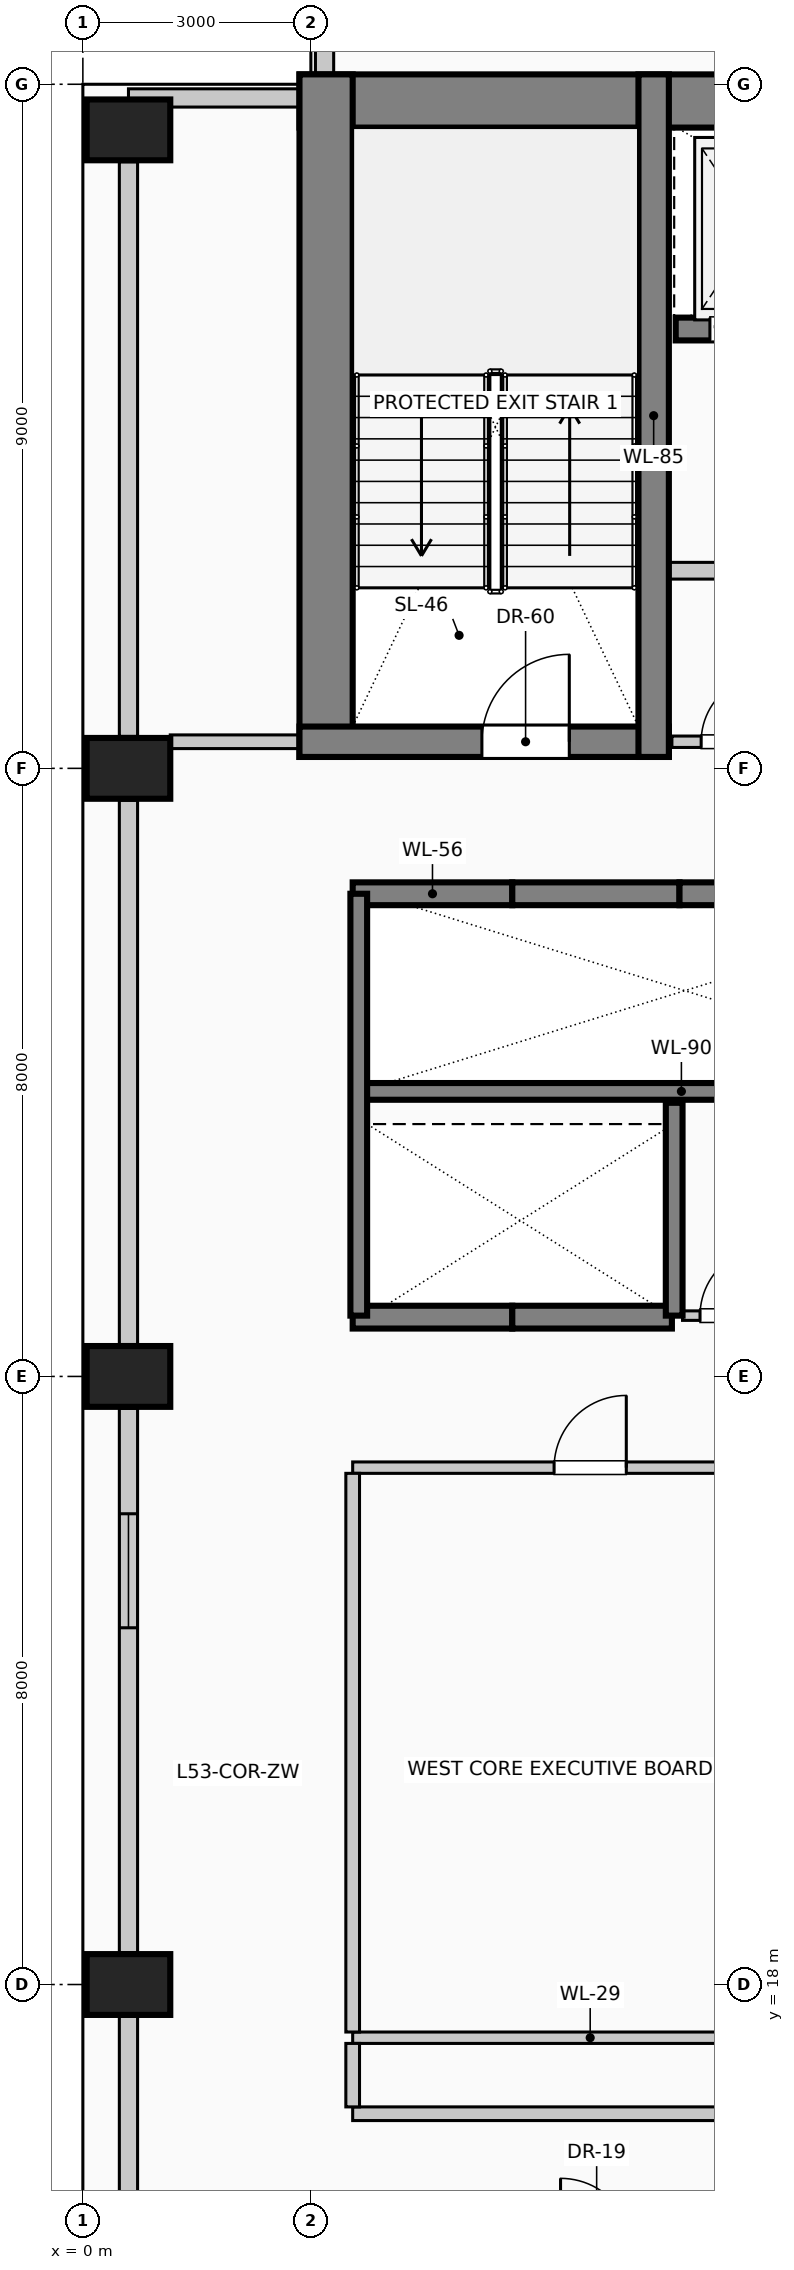
"""IFC4 building model, lengths in metres.
Left out: names, types, materials, properties, quantities, classifications, styles, units other than length and angle.
Written with IfcOpenShell. Run it as: python <this file> out.ifc"""

import sys

from ifc_helpers import new_model, si_unit, direction, frame, frame_2d, origin, origin_2d, place, context, subcontext, project, spatial, rectangle, extrude, element, fill, save


model = new_model("IFC4")
c1 = context("Model", 3, precision=1e-05, world=origin(), true_north=direction((0.0, 1.0)))
c2 = subcontext(c1, "Body", "Model", "MODEL_VIEW")
j1 = project(units=[si_unit("LENGTHUNIT", "METRE"), si_unit("PLANEANGLEUNIT", "RADIAN")], contexts=[c1])
p1 = place(None, origin())
s1 = spatial("IfcSite", under=j1, at=p1, CompositionType="ELEMENT")
p2 = place(p1, origin())
s2 = spatial("IfcBuilding", under=s1, at=p2, CompositionType="ELEMENT")
p3 = place(p2, frame((0.0, 0.0, 218.6)))
s3 = spatial("IfcBuildingStorey", under=s2, at=p3, CompositionType="ELEMENT", Elevation=218.6)
p4 = place(p3, frame((2.85, 42.78, 0.0), z_axis=(0.0, 0.0, 1.0), x_axis=(1.0, 0.0, 0.0)))
e1 = element("IfcWall", 1, at=p4, inside=s3, PredefinedType="SHEAR", context=c2, shape_type="SweptSolid", body=[
    extrude(rectangle(XDim=14.3, YDim=0.7, at=frame_2d((7.15, 0.0))), origin(), (0.0, 0.0, 1.0), 4.0),
])
p5 = place(p3, frame((3.2, 34.15, 0.0), z_axis=(0.0, 0.0, 1.0), x_axis=(0.0, 1.0, 0.0)))
e2 = element("IfcWall", 2, at=p5, inside=s3, PredefinedType="SHEAR", context=c2, shape_type="SweptSolid", body=[
    extrude(rectangle(XDim=8.98, YDim=0.7, at=frame_2d((4.49, 0.0))), origin(), (0.0, 0.0, 1.0), 4.0),
])
p6 = place(p3, frame((2.85, 34.35, 0.0), z_axis=(0.0, 0.0, 1.0), x_axis=(1.0, 0.0, 0.0)))
e3 = element("IfcWall", 3, at=p6, inside=s3, PredefinedType="SHEAR", context=c2, shape_type="SweptSolid", body=[
    extrude(rectangle(XDim=4.86, YDim=0.4, at=frame_2d((2.43, 0.0))), origin(), (0.0, 0.0, 1.0), 4.0),
])
p7 = place(p6, frame((2.4, 0.0, 0.0)))
e4 = element("IfcOpeningElement", 4, at=p7, cuts=e3, PredefinedType="OPENING", context=c2, shape_type="SweptSolid", body=[
    extrude(rectangle(XDim=1.15, YDim=2.2, at=frame_2d((0.575, 1.1))), frame((0.0, 0.21, 0.0), z_axis=(0.0, -1.0, 0.0), x_axis=(1.0, 0.0, 0.0)), (0.0, 0.0, 1.0), 0.42),
])
p8 = place(p3, frame((7.51, 34.15, 0.0), z_axis=(0.0, 0.0, 1.0), x_axis=(0.0, 1.0, 0.0)))
e5 = element("IfcWall", 5, at=p8, inside=s3, PredefinedType="SHEAR", context=c2, shape_type="SweptSolid", body=[
    extrude(rectangle(XDim=8.98, YDim=0.4, at=frame_2d((4.49, 0.0))), origin(), (0.0, 0.0, 1.0), 4.0),
])
for number, where, z_axis, x_axis in (
    (6, (0.6, 18.0, 0.0), (0.0, 0.0, 1.0), (0.0, 1.0, 0.0)),
    (7, (0.6, 26.0, 0.0), (0.0, 0.0, 1.0), (0.0, 1.0, 0.0)),
    (8, (0.6, 34.0, 0.0), (0.0, 0.0, 1.0), (0.0, 1.0, 0.0)),
    (9, (0.6, 42.4, 0.0), (0.0, 0.0, 1.0), (0.0, 1.0, 0.0)),
):
    element("IfcColumn", number, at=place(p3, frame(where, z_axis=z_axis, x_axis=x_axis)), inside=s3, PredefinedType="COLUMN", context=c2, shape_type="SweptSolid", body=[
        extrude(rectangle(XDim=0.8, YDim=1.1, at=origin_2d()), origin(), (0.0, 0.0, 1.0), 4.0),
    ])
p9 = place(p3, frame((0.6, 10.42, 0.0), z_axis=(0.0, 0.0, 1.0), x_axis=(0.0, 1.0, 0.0)))
e10 = element("IfcWall", 10, at=p9, inside=s3, PredefinedType="SOLIDWALL", context=c2, shape_type="SweptSolid", body=[
    extrude(rectangle(XDim=7.16, YDim=0.24, at=frame_2d((3.58, 0.0))), origin(), (0.0, 0.0, 1.0), 3.0),
])
p10 = place(p9, frame((1.387, 0.0, 0.42)))
e11 = element("IfcOpeningElement", 11, at=p10, cuts=e10, PredefinedType="OPENING", context=c2, shape_type="SweptSolid", body=[
    extrude(rectangle(XDim=1.5, YDim=2.2, at=frame_2d((0.75, 1.1))), frame((0.0, 0.13, 0.0), z_axis=(0.0, -1.0, 0.0), x_axis=(1.0, 0.0, 0.0)), (0.0, 0.0, 1.0), 0.26),
])
p11 = place(p3, frame((0.6, 18.42, 0.0), z_axis=(0.0, 0.0, 1.0), x_axis=(0.0, 1.0, 0.0)))
e12 = element("IfcWall", 12, at=p11, inside=s3, PredefinedType="SOLIDWALL", context=c2, shape_type="SweptSolid", body=[
    extrude(rectangle(XDim=7.16, YDim=0.24, at=frame_2d((3.58, 0.0))), origin(), (0.0, 0.0, 1.0), 3.0),
])
p12 = place(p11, frame((4.273, 0.0, 0.42)))
e13 = element("IfcOpeningElement", 13, at=p12, cuts=e12, PredefinedType="OPENING", context=c2, shape_type="SweptSolid", body=[
    extrude(rectangle(XDim=1.5, YDim=2.2, at=frame_2d((0.75, 1.1))), frame((0.0, 0.13, 0.0), z_axis=(0.0, -1.0, 0.0), x_axis=(1.0, 0.0, 0.0)), (0.0, 0.0, 1.0), 0.26),
])
p13 = place(p3, frame((0.6, 26.42, 0.0), z_axis=(0.0, 0.0, 1.0), x_axis=(0.0, 1.0, 0.0)))
e14 = element("IfcWall", 14, at=p13, inside=s3, PredefinedType="SOLIDWALL", context=c2, shape_type="SweptSolid", body=[
    extrude(rectangle(XDim=7.16, YDim=0.24, at=frame_2d((3.58, 0.0))), origin(), (0.0, 0.0, 1.0), 3.0),
])
p14 = place(p3, frame((0.6, 34.42, 0.0), z_axis=(0.0, 0.0, 1.0), x_axis=(0.0, 1.0, 0.0)))
e15 = element("IfcWall", 15, at=p14, inside=s3, PredefinedType="SOLIDWALL", context=c2, shape_type="SweptSolid", body=[
    extrude(rectangle(XDim=7.56, YDim=0.24, at=frame_2d((3.78, 0.0))), origin(), (0.0, 0.0, 1.0), 3.0),
])
p15 = place(p3, frame((0.6, 42.82, 0.0), z_axis=(0.0, 0.0, 1.0), x_axis=(1.0, 0.0, 0.0)))
e16 = element("IfcWall", 16, at=p15, inside=s3, PredefinedType="SOLIDWALL", context=c2, shape_type="SweptSolid", body=[
    extrude(rectangle(XDim=2.245, YDim=0.24, at=frame_2d((1.123, 0.0))), origin(), (0.0, 0.0, 1.0), 3.75),
])
p16 = place(p3, frame((3.18, 43.135, 0.0), z_axis=(0.0, 0.0, 1.0), x_axis=(0.0, 1.0, 0.0)))
e17 = element("IfcWall", 17, at=p16, inside=s3, PredefinedType="SOLIDWALL", context=c2, shape_type="SweptSolid", body=[
    extrude(rectangle(XDim=2.265, YDim=0.24, at=frame_2d((1.132, 0.0))), origin(), (0.0, 0.0, 1.0), 3.75),
])
p17 = place(p3, frame((3.55, 32.35, 0.0), z_axis=(0.0, 0.0, 1.0), x_axis=(1.0, 0.0, 0.0)))
e18 = element("IfcWall", 18, at=p17, inside=s3, PredefinedType="SOLIDWALL", context=c2, shape_type="SweptSolid", body=[
    extrude(rectangle(XDim=2.1, YDim=0.3, at=frame_2d((1.05, 0.0))), origin(), (0.0, 0.0, 1.0), 4.0),
])
p18 = place(p3, frame((5.65, 32.35, 0.0), z_axis=(0.0, 0.0, 1.0), x_axis=(1.0, 0.0, 0.0)))
e19 = element("IfcWall", 19, at=p18, inside=s3, PredefinedType="SOLIDWALL", context=c2, shape_type="SweptSolid", body=[
    extrude(rectangle(XDim=2.2, YDim=0.3, at=frame_2d((1.1, 0.0))), origin(), (0.0, 0.0, 1.0), 4.0),
])
p19 = place(p3, frame((7.85, 32.35, 0.0), z_axis=(0.0, 0.0, 1.0), x_axis=(1.0, 0.0, 0.0)))
e20 = element("IfcWall", 20, at=p19, inside=s3, PredefinedType="SOLIDWALL", context=c2, shape_type="SweptSolid", body=[
    extrude(rectangle(XDim=2.2, YDim=0.3, at=frame_2d((1.1, 0.0))), origin(), (0.0, 0.0, 1.0), 4.0),
])
p20 = place(p3, frame((5.65, 26.78, 0.0), z_axis=(0.0, 0.0, 1.0), x_axis=(-1.0, 0.0, 0.0)))
e21 = element("IfcWall", 21, at=p20, inside=s3, PredefinedType="SOLIDWALL", context=c2, shape_type="SweptSolid", body=[
    extrude(rectangle(XDim=2.1, YDim=0.3, at=frame_2d((1.05, 0.0))), origin(), (0.0, 0.0, 1.0), 4.0),
])
p21 = place(p3, frame((7.75, 26.78, 0.0), z_axis=(0.0, 0.0, 1.0), x_axis=(-1.0, 0.0, 0.0)))
e22 = element("IfcWall", 22, at=p21, inside=s3, PredefinedType="SOLIDWALL", context=c2, shape_type="SweptSolid", body=[
    extrude(rectangle(XDim=2.1, YDim=0.3, at=frame_2d((1.05, 0.0))), origin(), (0.0, 0.0, 1.0), 4.0),
])
p22 = place(p3, frame((10.0, 39.78, 0.0), z_axis=(0.0, 0.0, 1.0), x_axis=(-1.0, 0.0, 0.0)))
e23 = element("IfcWall", 23, at=p22, inside=s3, PredefinedType="SOLIDWALL", context=c2, shape_type="SweptSolid", body=[
    extrude(rectangle(XDim=2.2, YDim=0.3, at=frame_2d((1.1, 0.0))), origin(), (0.0, 0.0, 1.0), 4.0),
])
p23 = place(p22, frame((0.45, 0.0, 0.0)))
e24 = element("IfcOpeningElement", 24, at=p23, cuts=e23, PredefinedType="OPENING", context=c2, shape_type="SweptSolid", body=[
    extrude(rectangle(XDim=1.3, YDim=2.25, at=frame_2d((0.65, 1.125))), frame((0.0, 0.16, 0.0), z_axis=(0.0, -1.0, 0.0), x_axis=(1.0, 0.0, 0.0)), (0.0, 0.0, 1.0), 0.32),
])
p24 = place(p3, frame((3.55, 29.75, 0.0), z_axis=(0.0, 0.0, 1.0), x_axis=(1.0, 0.0, 0.0)))
e25 = element("IfcWall", 25, at=p24, inside=s3, PredefinedType="SOLIDWALL", context=c2, shape_type="SweptSolid", body=[
    extrude(rectangle(XDim=8.65, YDim=0.22, at=frame_2d((4.325, 0.0))), origin(), (0.0, 0.0, 1.0), 4.0),
])
p25 = place(p3, frame((3.63, 26.8, 0.0), z_axis=(0.0, 0.0, 1.0), x_axis=(0.0, 1.0, 0.0)))
e26 = element("IfcWall", 26, at=p25, inside=s3, PredefinedType="SOLIDWALL", context=c2, shape_type="SweptSolid", body=[
    extrude(rectangle(XDim=5.55, YDim=0.22, at=frame_2d((2.775, 0.0))), origin(), (0.0, 0.0, 1.0), 4.0),
])
p26 = place(p3, frame((7.78, 26.8, 0.0), z_axis=(0.0, 0.0, 1.0), x_axis=(0.0, 1.0, 0.0)))
e27 = element("IfcWall", 27, at=p26, inside=s3, PredefinedType="SOLIDWALL", context=c2, shape_type="SweptSolid", body=[
    extrude(rectangle(XDim=2.8, YDim=0.22, at=frame_2d((1.4, 0.0))), origin(), (0.0, 0.0, 1.0), 4.0),
])
p27 = place(p3, frame((7.51, 36.6, 0.0), z_axis=(0.0, 0.0, 1.0), x_axis=(1.0, 0.0, 0.0)))
e28 = element("IfcWall", 28, at=p27, inside=s3, PredefinedType="PARTITIONING", context=c2, shape_type="SweptSolid", body=[
    extrude(rectangle(XDim=4.98, YDim=0.22, at=frame_2d((2.49, 0.0))), origin(), (0.0, 0.0, 1.0), 3.75),
])
p28 = place(p27, frame((1.94, 0.0, 0.0)))
e29 = element("IfcOpeningElement", 29, at=p28, cuts=e28, PredefinedType="OPENING", context=c2, shape_type="SweptSolid", body=[
    extrude(rectangle(XDim=1.1, YDim=2.2, at=frame_2d((0.55, 1.1))), frame((0.0, 0.12, 0.0), z_axis=(0.0, -1.0, 0.0), x_axis=(1.0, 0.0, 0.0)), (0.0, 0.0, 1.0), 0.24),
])
p29 = place(p3, frame((3.55, 16.3, 0.0), z_axis=(0.0, 0.0, 1.0), x_axis=(1.0, 0.0, 0.0)))
e30 = element("IfcWall", 30, at=p29, inside=s3, PredefinedType="PARTITIONING", context=c2, shape_type="SweptSolid", body=[
    extrude(rectangle(XDim=12.3, YDim=0.18, at=frame_2d((6.15, 0.0))), origin(), (0.0, 0.0, 1.0), 3.75),
])
p30 = place(p3, frame((3.55, 17.3, 0.0), z_axis=(0.0, 0.0, 1.0), x_axis=(1.0, 0.0, 0.0)))
e31 = element("IfcWall", 31, at=p30, inside=s3, PredefinedType="PARTITIONING", context=c2, shape_type="SweptSolid", body=[
    extrude(rectangle(XDim=6.25, YDim=0.15, at=frame_2d((3.125, 0.0))), origin(), (0.0, 0.0, 1.0), 3.75),
])
p31 = place(p3, frame((3.55, 24.8, 0.0), z_axis=(0.0, 0.0, 1.0), x_axis=(1.0, 0.0, 0.0)))
e32 = element("IfcWall", 32, at=p31, inside=s3, PredefinedType="PARTITIONING", context=c2, shape_type="SweptSolid", body=[
    extrude(rectangle(XDim=6.25, YDim=0.15, at=frame_2d((3.125, 0.0))), origin(), (0.0, 0.0, 1.0), 3.75),
])
p32 = place(p31, frame((2.65, 0.0, 0.0)))
e33 = element("IfcOpeningElement", 33, at=p32, cuts=e32, PredefinedType="OPENING", context=c2, shape_type="SweptSolid", body=[
    extrude(rectangle(XDim=0.95, YDim=2.15, at=frame_2d((0.475, 1.075))), frame((0.0, 0.085, 0.0), z_axis=(0.0, -1.0, 0.0), x_axis=(1.0, 0.0, 0.0)), (0.0, 0.0, 1.0), 0.17),
])
p33 = place(p3, frame((7.89, 26.8, 0.0), z_axis=(0.0, 0.0, 1.0), x_axis=(1.0, 0.0, 0.0)))
e34 = element("IfcWall", 34, at=p33, inside=s3, PredefinedType="PARTITIONING", context=c2, shape_type="SweptSolid", body=[
    extrude(rectangle(XDim=1.36, YDim=0.125, at=frame_2d((0.68, 0.0))), origin(), (0.0, 0.0, 1.0), 3.75),
])
p34 = place(p33, frame((0.23, 0.0, 0.0)))
e35 = element("IfcOpeningElement", 35, at=p34, cuts=e34, PredefinedType="OPENING", context=c2, shape_type="SweptSolid", body=[
    extrude(rectangle(XDim=0.9, YDim=2.1, at=frame_2d((0.45, 1.05))), frame((0.0, 0.073, 0.0), z_axis=(0.0, -1.0, 0.0), x_axis=(1.0, 0.0, 0.0)), (0.0, 0.0, 1.0), 0.145),
])
p35 = place(p3, frame((1.15, 34.35, 0.0), z_axis=(0.0, 0.0, 1.0), x_axis=(1.0, 0.0, 0.0)))
e36 = element("IfcWall", 36, at=p35, inside=s3, PredefinedType="PARTITIONING", context=c2, shape_type="SweptSolid", body=[
    extrude(rectangle(XDim=1.7, YDim=0.18, at=frame_2d((0.85, 0.0))), origin(), (0.0, 0.0, 1.0), 3.75),
])
p36 = place(p3, frame((7.75, 34.35, 0.0), z_axis=(0.0, 0.0, 1.0), x_axis=(1.0, 0.0, 0.0)))
e37 = element("IfcWall", 37, at=p36, inside=s3, PredefinedType="PARTITIONING", context=c2, shape_type="SweptSolid", body=[
    extrude(rectangle(XDim=1.65, YDim=0.15, at=frame_2d((0.825, 0.0))), origin(), (0.0, 0.0, 1.0), 3.75),
])
p37 = place(p36, frame((0.385, 0.0, 0.0)))
e38 = element("IfcOpeningElement", 38, at=p37, cuts=e37, PredefinedType="OPENING", context=c2, shape_type="SweptSolid", body=[
    extrude(rectangle(XDim=0.88, YDim=2.1, at=frame_2d((0.44, 1.05))), frame((0.0, 0.085, 0.0), z_axis=(0.0, -1.0, 0.0), x_axis=(1.0, 0.0, 0.0)), (0.0, 0.0, 1.0), 0.17),
])
p38 = place(p3, frame((3.55, 16.39, 0.0), z_axis=(0.0, 0.0, 1.0), x_axis=(0.0, 1.0, 0.0)))
e39 = element("IfcWall", 39, at=p38, inside=s3, PredefinedType="PARTITIONING", context=c2, shape_type="SweptSolid", body=[
    extrude(rectangle(XDim=0.835, YDim=0.18, at=frame_2d((0.417, 0.0))), origin(), (0.0, 0.0, 1.0), 3.75),
])
p39 = place(p3, frame((3.55, 17.375, 0.0), z_axis=(0.0, 0.0, 1.0), x_axis=(0.0, 1.0, 0.0)))
e40 = element("IfcWall", 40, at=p39, inside=s3, PredefinedType="PARTITIONING", context=c2, shape_type="SweptSolid", body=[
    extrude(rectangle(XDim=7.35, YDim=0.18, at=frame_2d((3.675, 0.0))), origin(), (0.0, 0.0, 1.0), 3.75),
])
p40 = place(p12, origin())
e41 = element("IfcWindow", 41, at=p40, inside=s3, PartitioningType="SINGLE_PANEL", PredefinedType="WINDOW", context=c2, shape_type="SweptSolid", body=[
    extrude(rectangle(XDim=1.5, YDim=2.2, at=frame_2d((0.75, 1.1))), frame((0.0, 0.03, 0.0), z_axis=(0.0, -1.0, 0.0), x_axis=(1.0, 0.0, 0.0)), (0.0, 0.0, 1.0), 0.06),
])
fill(e13, e41)
p41 = place(p23, origin())
e42 = element("IfcDoor", 42, at=p41, inside=s3, OperationType="SLIDING_TO_LEFT", PredefinedType="DOOR", context=c2, shape_type="SweptSolid", body=[
    extrude(rectangle(XDim=1.3, YDim=2.25, at=frame_2d((0.65, 1.125))), frame((0.0, 0.025, 0.0), z_axis=(0.0, -1.0, 0.0), x_axis=(1.0, 0.0, 0.0)), (0.0, 0.0, 1.0), 0.05),
])
fill(e24, e42)
p42 = place(p7, origin())
e43 = element("IfcDoor", 43, at=p42, inside=s3, OperationType="SINGLE_SWING_RIGHT", PredefinedType="DOOR", context=c2, shape_type="SweptSolid", body=[
    extrude(rectangle(XDim=1.15, YDim=2.2, at=frame_2d((0.575, 1.1))), frame((0.0, 0.025, 0.0), z_axis=(0.0, -1.0, 0.0), x_axis=(1.0, 0.0, 0.0)), (0.0, 0.0, 1.0), 0.05),
])
fill(e4, e43)
p43 = place(p32, origin())
e44 = element("IfcDoor", 44, at=p43, inside=s3, OperationType="SINGLE_SWING_RIGHT", PredefinedType="DOOR", context=c2, shape_type="SweptSolid", body=[
    extrude(rectangle(XDim=0.95, YDim=2.15, at=frame_2d((0.475, 1.075))), frame((0.0, 0.025, 0.0), z_axis=(0.0, -1.0, 0.0), x_axis=(1.0, 0.0, 0.0)), (0.0, 0.0, 1.0), 0.05),
])
fill(e33, e44)
p44 = place(p34, origin())
e45 = element("IfcDoor", 45, at=p44, inside=s3, OperationType="SINGLE_SWING_RIGHT", PredefinedType="DOOR", context=c2, shape_type="SweptSolid", body=[
    extrude(rectangle(XDim=0.9, YDim=2.1, at=frame_2d((0.45, 1.05))), frame((0.0, 0.025, 0.0), z_axis=(0.0, -1.0, 0.0), x_axis=(1.0, 0.0, 0.0)), (0.0, 0.0, 1.0), 0.05),
])
fill(e35, e45)
p45 = place(p37, origin())
e46 = element("IfcDoor", 46, at=p45, inside=s3, OperationType="SINGLE_SWING_RIGHT", PredefinedType="DOOR", context=c2, shape_type="SweptSolid", body=[
    extrude(rectangle(XDim=0.88, YDim=2.1, at=frame_2d((0.44, 1.05))), frame((0.0, 0.025, 0.0), z_axis=(0.0, -1.0, 0.0), x_axis=(1.0, 0.0, 0.0)), (0.0, 0.0, 1.0), 0.05),
])
fill(e38, e46)
save(model, sys.argv[1])
